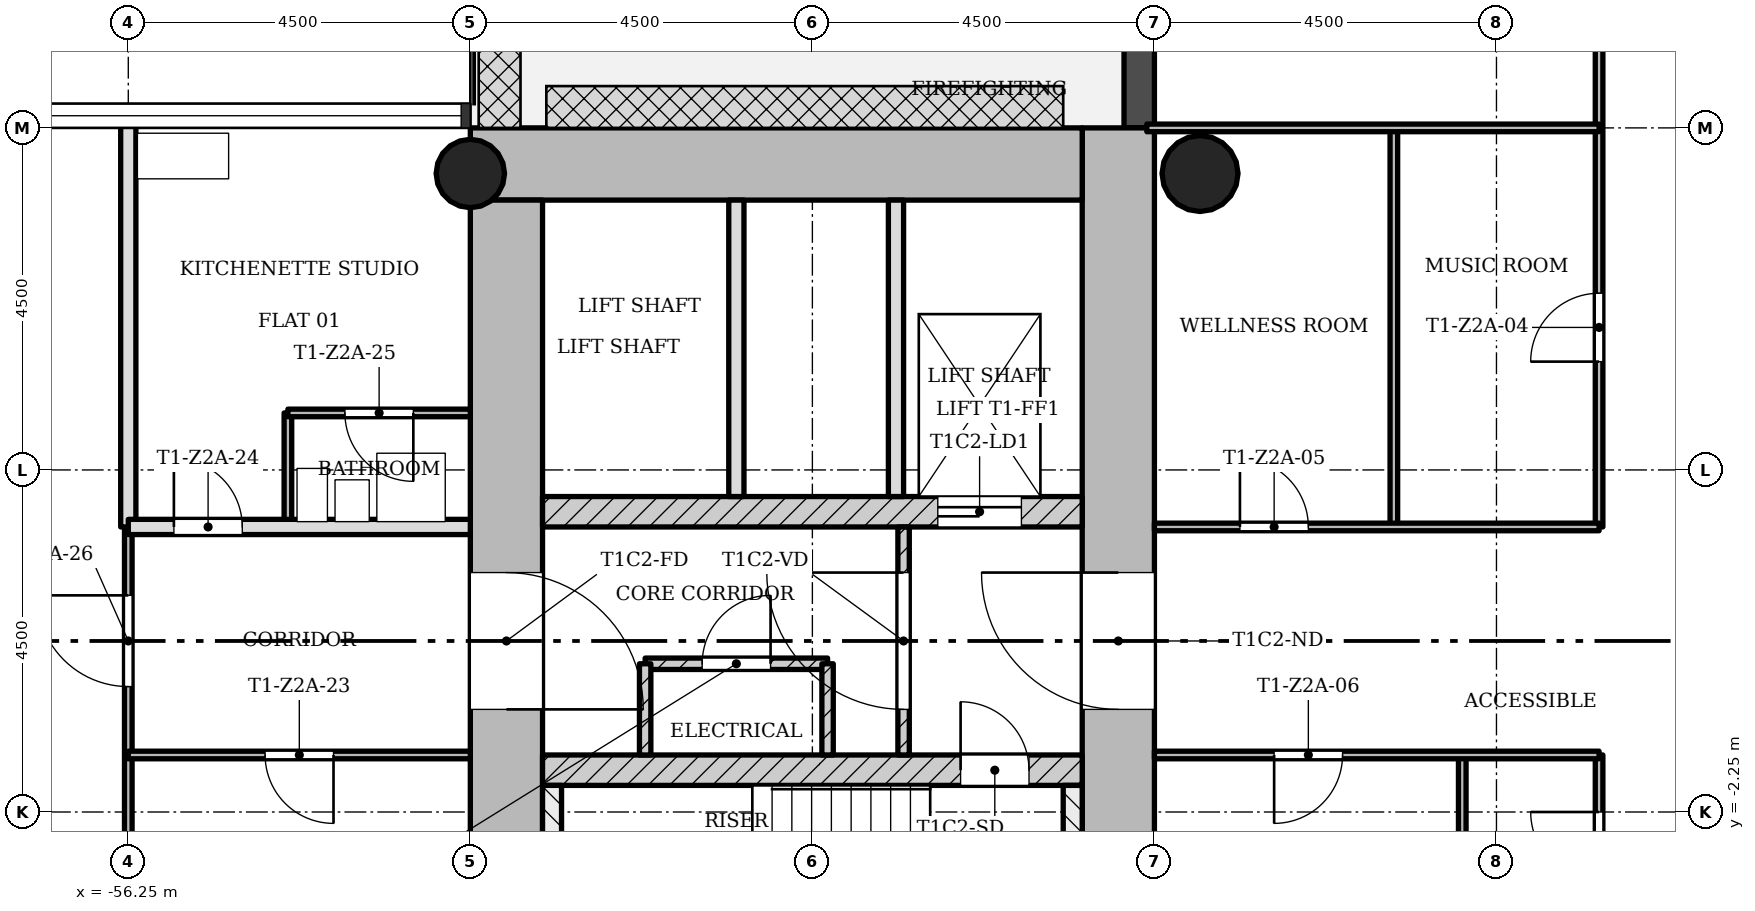
"""IFC4 building model, lengths in metres.
Left out: names, types, materials, properties, quantities, classifications, styles, units other than length and angle.
Written with IfcOpenShell. Run it as: python <this file> out.ifc"""

import sys

from ifc_helpers import new_model, si_unit, direction, frame, frame_2d, origin, origin_2d, place, context, subcontext, project, spatial, rectangle, hollow_circle, extrude, element, fill, save


model = new_model("IFC4")
c1 = context("Model", 3, precision=1e-05, world=origin(), true_north=direction((0.0, 1.0)))
c2 = subcontext(c1, "Body", "Model", "MODEL_VIEW")
j1 = project(units=[si_unit("LENGTHUNIT", "METRE"), si_unit("PLANEANGLEUNIT", "RADIAN")], contexts=[c1])
p1 = place(None, origin())
s1 = spatial("IfcSite", under=j1, at=p1, CompositionType="ELEMENT")
p2 = place(p1, origin())
s2 = spatial("IfcBuilding", under=s1, at=p2, CompositionType="ELEMENT")
p3 = place(p2, frame((0.0, 0.0, 117.4)))
s3 = spatial("IfcBuildingStorey", under=s2, at=p3, CompositionType="ELEMENT", Elevation=117.4)
p4 = place(p3, frame((-43.225, -5.8, 0.0), z_axis=(0.0, 0.0, 1.0), x_axis=(0.0, 1.0, 0.0)))
e1 = element("IfcWall", 1, at=p4, inside=s3, PredefinedType="SHEAR", context=c2, shape_type="SweptSolid", body=[
    extrude(rectangle(XDim=12.55, YDim=0.95, at=frame_2d((6.275, 0.0))), origin(), (0.0, 0.0, 1.0), 3.4),
])
p5 = place(p4, frame((4.9, 0.0, 0.0)))
e2 = element("IfcOpeningElement", 2, at=p5, cuts=e1, PredefinedType="OPENING", context=c2, shape_type="SweptSolid", body=[
    extrude(rectangle(XDim=1.8, YDim=2.1, at=frame_2d((0.9, 1.05))), frame((0.0, 0.485, 0.0), z_axis=(0.0, -1.0, 0.0), x_axis=(1.0, 0.0, 0.0)), (0.0, 0.0, 1.0), 0.97),
])
p6 = place(p3, frame((-43.7, 6.275, 0.0), z_axis=(0.0, 0.0, 1.0), x_axis=(-1.0, 0.0, 0.0)))
e3 = element("IfcWall", 3, at=p6, inside=s3, PredefinedType="SHEAR", context=c2, shape_type="SweptSolid", body=[
    extrude(rectangle(XDim=8.05, YDim=0.95, at=frame_2d((4.025, 0.0))), origin(), (0.0, 0.0, 1.0), 3.4),
])
p7 = place(p3, frame((-51.275, 5.8, 0.0), z_axis=(0.0, 0.0, 1.0), x_axis=(0.0, -1.0, 0.0)))
e4 = element("IfcWall", 4, at=p7, inside=s3, PredefinedType="SHEAR", context=c2, shape_type="SweptSolid", body=[
    extrude(rectangle(XDim=12.55, YDim=0.95, at=frame_2d((6.275, 0.0))), origin(), (0.0, 0.0, 1.0), 3.4),
])
p8 = place(p7, frame((4.9, 0.0, 0.0)))
e5 = element("IfcOpeningElement", 5, at=p8, cuts=e4, PredefinedType="OPENING", context=c2, shape_type="SweptSolid", body=[
    extrude(rectangle(XDim=1.8, YDim=2.1, at=frame_2d((0.9, 1.05))), frame((0.0, 0.485, 0.0), z_axis=(0.0, -1.0, 0.0), x_axis=(1.0, 0.0, 0.0)), (0.0, 0.0, 1.0), 0.97),
])
p9 = place(p3, frame((-50.8, -1.7, 0.0), z_axis=(0.0, 0.0, 1.0), x_axis=(1.0, 0.0, 0.0)))
e6 = element("IfcWall", 6, at=p9, inside=s3, PredefinedType="SHEAR", context=c2, shape_type="SweptSolid", body=[
    extrude(rectangle(XDim=7.1, YDim=0.4, at=frame_2d((3.55, 0.0))), origin(), (0.0, 0.0, 1.0), 3.4),
])
p10 = place(p9, frame((5.5, 0.0, 0.0)))
e7 = element("IfcOpeningElement", 7, at=p10, cuts=e6, PredefinedType="OPENING", context=c2, shape_type="SweptSolid", body=[
    extrude(rectangle(XDim=0.9, YDim=2.1, at=frame_2d((0.45, 1.05))), frame((0.0, 0.21, 0.0), z_axis=(0.0, -1.0, 0.0), x_axis=(1.0, 0.0, 0.0)), (0.0, 0.0, 1.0), 0.42),
])
p11 = place(p3, frame((-50.8, 1.7, 0.0), z_axis=(0.0, 0.0, 1.0), x_axis=(1.0, 0.0, 0.0)))
e8 = element("IfcWall", 8, at=p11, inside=s3, PredefinedType="SHEAR", context=c2, shape_type="SweptSolid", body=[
    extrude(rectangle(XDim=7.1, YDim=0.4, at=frame_2d((3.55, 0.0))), origin(), (0.0, 0.0, 1.0), 3.4),
])
p12 = place(p11, frame((5.2, 0.0, 0.0)))
e9 = element("IfcOpeningElement", 9, at=p12, cuts=e8, PredefinedType="OPENING", context=c2, shape_type="SweptSolid", body=[
    extrude(rectangle(XDim=1.1, YDim=2.1, at=frame_2d((0.55, 1.05))), frame((0.0, 0.21, 0.0), z_axis=(0.0, -1.0, 0.0), x_axis=(1.0, 0.0, 0.0)), (0.0, 0.0, 1.0), 0.42),
])
p13 = place(p3, frame((-51.75, 6.15, 0.0), z_axis=(0.0, 0.0, 1.0), x_axis=(1.0, 0.0, 0.0)))
e10 = element("IfcColumn", 10, at=p13, inside=s3, PredefinedType="COLUMN", context=c2, shape_type="SweptSolid", body=[
    extrude(hollow_circle(Radius=0.45, WallThickness=0.032, at=origin_2d()), origin(), (0.0, 0.0, 1.0), 3.4),
])
p14 = place(p3, frame((-42.15, 6.15, 0.0), z_axis=(0.0, 0.0, 1.0), x_axis=(1.0, 0.0, 0.0)))
e11 = element("IfcColumn", 11, at=p14, inside=s3, PredefinedType="COLUMN", context=c2, shape_type="SweptSolid", body=[
    extrude(hollow_circle(Radius=0.5, WallThickness=0.036, at=origin_2d()), origin(), (0.0, 0.0, 1.0), 3.4),
])
p15 = place(p3, frame((-42.95, 11.25, -0.02), z_axis=(0.0, 0.0, 1.0), x_axis=(0.0, -1.0, 0.0)))
e12 = element("IfcWall", 12, at=p15, inside=s3, PredefinedType="STANDARD", context=c2, shape_type="SweptSolid", body=[
    extrude(rectangle(XDim=4.5, YDim=0.4, at=frame_2d((2.25, 0.0))), origin(), (0.0, 0.0, 1.0), 3.12),
])
p16 = place(p15, frame((1.35, 0.0, 0.02)))
e13 = element("IfcOpeningElement", 13, at=p16, cuts=e12, PredefinedType="OPENING", context=c2, shape_type="SweptSolid", body=[
    extrude(rectangle(XDim=1.8, YDim=2.1, at=frame_2d((0.9, 1.05))), frame((0.0, 0.21, 0.0), z_axis=(0.0, -1.0, 0.0), x_axis=(1.0, 0.0, 0.0)), (0.0, 0.0, 1.0), 0.42),
])
p17 = place(p3, frame((-46.05, 1.5, 0.0), z_axis=(0.0, 0.0, 1.0), x_axis=(0.0, -1.0, 0.0)))
e14 = element("IfcWall", 14, at=p17, inside=s3, PredefinedType="PARTITIONING", context=c2, shape_type="SweptSolid", body=[
    extrude(rectangle(XDim=3.0, YDim=0.15, at=frame_2d((1.5, 0.0))), origin(), (0.0, 0.0, 1.0), 3.0),
])
p18 = place(p17, frame((0.6, 0.0, 0.0)))
e15 = element("IfcOpeningElement", 15, at=p18, cuts=e14, PredefinedType="OPENING", context=c2, shape_type="SweptSolid", body=[
    extrude(rectangle(XDim=1.8, YDim=2.1, at=frame_2d((0.9, 1.05))), frame((0.0, 0.085, 0.0), z_axis=(0.0, -1.0, 0.0), x_axis=(1.0, 0.0, 0.0)), (0.0, 0.0, 1.0), 0.17),
])
for number, where, z_axis, x_axis in (
    (16, (-46.15, 5.8, 0.0), (0.0, 0.0, 1.0), (0.0, -1.0, 0.0)),
    (17, (-48.25, 5.8, 0.0), (0.0, 0.0, 1.0), (0.0, -1.0, 0.0)),
):
    element("IfcWall", number, at=place(p3, frame(where, z_axis=z_axis, x_axis=x_axis)), inside=s3, PredefinedType="SOLIDWALL", context=c2, shape_type="SweptSolid", body=[
        extrude(rectangle(XDim=3.9, YDim=0.2, at=frame_2d((1.95, 0.0))), origin(), (0.0, 0.0, 1.0), 3.0),
    ])
p19 = place(p3, frame((-47.05, -0.3, 0.0), z_axis=(0.0, 0.0, 1.0), x_axis=(-1.0, 0.0, 0.0)))
e18 = element("IfcWall", 18, at=p19, inside=s3, PredefinedType="PARTITIONING", context=c2, shape_type="SweptSolid", body=[
    extrude(rectangle(XDim=2.4, YDim=0.15, at=frame_2d((1.2, 0.0))), origin(), (0.0, 0.0, 1.0), 3.0),
])
p20 = place(p19, frame((0.75, 0.0, 0.0)))
e19 = element("IfcOpeningElement", 19, at=p20, cuts=e18, PredefinedType="OPENING", context=c2, shape_type="SweptSolid", body=[
    extrude(rectangle(XDim=0.9, YDim=2.1, at=frame_2d((0.45, 1.05))), frame((0.0, 0.085, 0.0), z_axis=(0.0, -1.0, 0.0), x_axis=(1.0, 0.0, 0.0)), (0.0, 0.0, 1.0), 0.17),
])
for number, where, z_axis, x_axis in (
    (20, (-47.05, -0.3, 0.0), (0.0, 0.0, 1.0), (0.0, -1.0, 0.0)),
    (21, (-49.45, -0.3, 0.0), (0.0, 0.0, 1.0), (0.0, -1.0, 0.0)),
):
    element("IfcWall", number, at=place(p3, frame(where, z_axis=z_axis, x_axis=x_axis)), inside=s3, PredefinedType="PARTITIONING", context=c2, shape_type="SweptSolid", body=[
        extrude(rectangle(XDim=1.2, YDim=0.15, at=frame_2d((0.6, 0.0))), origin(), (0.0, 0.0, 1.0), 3.0),
    ])
p21 = place(p3, frame((-56.25, -6.85, 0.0), z_axis=(0.0, 0.0, 1.0), x_axis=(0.0, 1.0, 0.0)))
e22 = element("IfcWall", 22, at=p21, inside=s3, PredefinedType="PARTITIONING", context=c2, shape_type="SweptSolid", body=[
    extrude(rectangle(XDim=8.35, YDim=0.1, at=frame_2d((4.175, 0.0))), origin(), (0.0, 0.0, 1.0), 3.0),
])
p22 = place(p21, frame((6.25, 0.0, 0.0)))
e23 = element("IfcOpeningElement", 23, at=p22, cuts=e22, PredefinedType="OPENING", context=c2, shape_type="SweptSolid", body=[
    extrude(rectangle(XDim=1.2, YDim=2.1, at=frame_2d((0.6, 1.05))), frame((0.0, 0.06, 0.0), z_axis=(0.0, -1.0, 0.0), x_axis=(1.0, 0.0, 0.0)), (0.0, 0.0, 1.0), 0.12),
])
p23 = place(p3, frame((-56.25, 1.5, 0.0), z_axis=(0.0, 0.0, 1.0), x_axis=(0.0, 1.0, 0.0)))
e24 = element("IfcWall", 24, at=p23, inside=s3, PredefinedType="SOLIDWALL", context=c2, shape_type="SweptSolid", body=[
    extrude(rectangle(XDim=5.35, YDim=0.2, at=frame_2d((2.675, 0.0))), origin(), (0.0, 0.0, 1.0), 3.0),
])
p24 = place(p3, frame((-54.15, 1.5, 0.0), z_axis=(0.0, 0.0, 1.0), x_axis=(0.0, 1.0, 0.0)))
e25 = element("IfcWall", 25, at=p24, inside=s3, PredefinedType="PARTITIONING", context=c2, shape_type="SweptSolid", body=[
    extrude(rectangle(XDim=1.5, YDim=0.1, at=frame_2d((0.75, 0.0))), origin(), (0.0, 0.0, 1.0), 3.0),
])
p25 = place(p3, frame((-39.6, 1.5, 0.0), z_axis=(0.0, 0.0, 1.0), x_axis=(0.0, 1.0, 0.0)))
e26 = element("IfcWall", 26, at=p25, inside=s3, PredefinedType="PARTITIONING", context=c2, shape_type="SweptSolid", body=[
    extrude(rectangle(XDim=5.25, YDim=0.1, at=frame_2d((2.625, 0.0))), origin(), (0.0, 0.0, 1.0), 3.0),
])
p26 = place(p3, frame((-38.7, -3.9, 0.0), z_axis=(0.0, 0.0, 1.0), x_axis=(0.0, 1.0, 0.0)))
e27 = element("IfcWall", 27, at=p26, inside=s3, PredefinedType="PARTITIONING", context=c2, shape_type="SweptSolid", body=[
    extrude(rectangle(XDim=2.4, YDim=0.1, at=frame_2d((1.2, 0.0))), origin(), (0.0, 0.0, 1.0), 3.0),
])
p27 = place(p3, frame((-36.9, -6.75, 0.0), z_axis=(0.0, 0.0, 1.0), x_axis=(0.0, 1.0, 0.0)))
e28 = element("IfcWall", 28, at=p27, inside=s3, PredefinedType="PARTITIONING", context=c2, shape_type="SweptSolid", body=[
    extrude(rectangle(XDim=5.25, YDim=0.1, at=frame_2d((2.625, 0.0))), origin(), (0.0, 0.0, 1.0), 3.0),
])
p28 = place(p27, frame((3.6, 0.0, 0.0)))
e29 = element("IfcOpeningElement", 29, at=p28, cuts=e28, PredefinedType="OPENING", context=c2, shape_type="SweptSolid", body=[
    extrude(rectangle(XDim=0.9, YDim=2.1, at=frame_2d((0.45, 1.05))), frame((0.0, 0.06, 0.0), z_axis=(0.0, -1.0, 0.0), x_axis=(1.0, 0.0, 0.0)), (0.0, 0.0, 1.0), 0.12),
])
p29 = place(p27, frame((0.975, 0.0, 0.0)))
e30 = element("IfcOpeningElement", 30, at=p29, cuts=e28, PredefinedType="OPENING", context=c2, shape_type="SweptSolid", body=[
    extrude(rectangle(XDim=0.9, YDim=2.1, at=frame_2d((0.45, 1.05))), frame((0.0, 0.06, 0.0), z_axis=(0.0, -1.0, 0.0), x_axis=(1.0, 0.0, 0.0)), (0.0, 0.0, 1.0), 0.12),
])
p30 = place(p3, frame((-36.9, 1.5, 0.0), z_axis=(0.0, 0.0, 1.0), x_axis=(0.0, 1.0, 0.0)))
e31 = element("IfcWall", 31, at=p30, inside=s3, PredefinedType="PARTITIONING", context=c2, shape_type="SweptSolid", body=[
    extrude(rectangle(XDim=9.75, YDim=0.1, at=frame_2d((4.875, 0.0))), origin(), (0.0, 0.0, 1.0), 3.0),
])
p31 = place(p30, frame((2.175, 0.0, 0.0)))
e32 = element("IfcOpeningElement", 32, at=p31, cuts=e31, PredefinedType="OPENING", context=c2, shape_type="SweptSolid", body=[
    extrude(rectangle(XDim=0.9, YDim=2.1, at=frame_2d((0.45, 1.05))), frame((0.0, 0.06, 0.0), z_axis=(0.0, -1.0, 0.0), x_axis=(1.0, 0.0, 0.0)), (0.0, 0.0, 1.0), 0.12),
])
p32 = place(p30, frame((7.05, 0.0, 0.0)))
e33 = element("IfcOpeningElement", 33, at=p32, cuts=e31, PredefinedType="OPENING", context=c2, shape_type="SweptSolid", body=[
    extrude(rectangle(XDim=0.9, YDim=2.1, at=frame_2d((0.45, 1.05))), frame((0.0, 0.06, 0.0), z_axis=(0.0, -1.0, 0.0), x_axis=(1.0, 0.0, 0.0)), (0.0, 0.0, 1.0), 0.12),
])
p33 = place(p3, frame((-56.25, -1.5, 0.0), z_axis=(0.0, 0.0, 1.0), x_axis=(1.0, 0.0, 0.0)))
e34 = element("IfcWall", 34, at=p33, inside=s3, PredefinedType="PARTITIONING", context=c2, shape_type="SweptSolid", body=[
    extrude(rectangle(XDim=4.5, YDim=0.1, at=frame_2d((2.25, 0.0))), origin(), (0.0, 0.0, 1.0), 3.0),
])
p34 = place(p33, frame((1.8, 0.0, 0.0)))
e35 = element("IfcOpeningElement", 35, at=p34, cuts=e34, PredefinedType="OPENING", context=c2, shape_type="SweptSolid", body=[
    extrude(rectangle(XDim=0.9, YDim=2.1, at=frame_2d((0.45, 1.05))), frame((0.0, 0.06, 0.0), z_axis=(0.0, -1.0, 0.0), x_axis=(1.0, 0.0, 0.0)), (0.0, 0.0, 1.0), 0.12),
])
p35 = place(p3, frame((-42.75, -1.5, 0.0), z_axis=(0.0, 0.0, 1.0), x_axis=(1.0, 0.0, 0.0)))
e36 = element("IfcWall", 36, at=p35, inside=s3, PredefinedType="PARTITIONING", context=c2, shape_type="SweptSolid", body=[
    extrude(rectangle(XDim=5.85, YDim=0.1, at=frame_2d((2.925, 0.0))), origin(), (0.0, 0.0, 1.0), 3.0),
])
p36 = place(p35, frame((1.575, 0.0, 0.0)))
e37 = element("IfcOpeningElement", 37, at=p36, cuts=e36, PredefinedType="OPENING", context=c2, shape_type="SweptSolid", body=[
    extrude(rectangle(XDim=0.9, YDim=2.1, at=frame_2d((0.45, 1.05))), frame((0.0, 0.06, 0.0), z_axis=(0.0, -1.0, 0.0), x_axis=(1.0, 0.0, 0.0)), (0.0, 0.0, 1.0), 0.12),
])
p37 = place(p3, frame((-42.75, 1.5, 0.0), z_axis=(0.0, 0.0, 1.0), x_axis=(1.0, 0.0, 0.0)))
e38 = element("IfcWall", 38, at=p37, inside=s3, PredefinedType="PARTITIONING", context=c2, shape_type="SweptSolid", body=[
    extrude(rectangle(XDim=5.85, YDim=0.1, at=frame_2d((2.925, 0.0))), origin(), (0.0, 0.0, 1.0), 3.0),
])
p38 = place(p37, frame((1.125, 0.0, 0.0)))
e39 = element("IfcOpeningElement", 39, at=p38, cuts=e38, PredefinedType="OPENING", context=c2, shape_type="SweptSolid", body=[
    extrude(rectangle(XDim=0.9, YDim=2.1, at=frame_2d((0.45, 1.05))), frame((0.0, 0.06, 0.0), z_axis=(0.0, -1.0, 0.0), x_axis=(1.0, 0.0, 0.0)), (0.0, 0.0, 1.0), 0.12),
])
p39 = place(p3, frame((-56.25, 1.5, 0.0), z_axis=(0.0, 0.0, 1.0), x_axis=(1.0, 0.0, 0.0)))
e40 = element("IfcWall", 40, at=p39, inside=s3, PredefinedType="SOLIDWALL", context=c2, shape_type="SweptSolid", body=[
    extrude(rectangle(XDim=4.5, YDim=0.2, at=frame_2d((2.25, 0.0))), origin(), (0.0, 0.0, 1.0), 3.0),
])
p40 = place(p39, frame((0.6, 0.0, 0.0)))
e41 = element("IfcOpeningElement", 41, at=p40, cuts=e40, PredefinedType="OPENING", context=c2, shape_type="SweptSolid", body=[
    extrude(rectangle(XDim=0.9, YDim=2.1, at=frame_2d((0.45, 1.05))), frame((0.0, 0.11, 0.0), z_axis=(0.0, -1.0, 0.0), x_axis=(1.0, 0.0, 0.0)), (0.0, 0.0, 1.0), 0.22),
])
p41 = place(p3, frame((-54.15, 3.0, 0.0), z_axis=(0.0, 0.0, 1.0), x_axis=(1.0, 0.0, 0.0)))
e42 = element("IfcWall", 42, at=p41, inside=s3, PredefinedType="PARTITIONING", context=c2, shape_type="SweptSolid", body=[
    extrude(rectangle(XDim=2.4, YDim=0.1, at=frame_2d((1.2, 0.0))), origin(), (0.0, 0.0, 1.0), 3.0),
])
p42 = place(p41, frame((0.75, 0.0, 0.0)))
e43 = element("IfcOpeningElement", 43, at=p42, cuts=e42, PredefinedType="OPENING", context=c2, shape_type="SweptSolid", body=[
    extrude(rectangle(XDim=0.9, YDim=2.1, at=frame_2d((0.45, 1.05))), frame((0.0, 0.06, 0.0), z_axis=(0.0, -1.0, 0.0), x_axis=(1.0, 0.0, 0.0)), (0.0, 0.0, 1.0), 0.12),
])
p43 = place(p3, frame((-42.85, 6.75, 0.0), z_axis=(0.0, 0.0, 1.0), x_axis=(1.0, 0.0, 0.0)))
e44 = element("IfcWall", 44, at=p43, inside=s3, PredefinedType="PARTITIONING", context=c2, shape_type="SweptSolid", body=[
    extrude(rectangle(XDim=5.95, YDim=0.1, at=frame_2d((2.975, 0.0))), origin(), (0.0, 0.0, 1.0), 3.0),
])
for number, where, z_axis, x_axis in (
    (45, (-50.675, -1.9, 0.0), (0.0, 0.0, 1.0), (0.0, -1.0, 0.0)),
    (46, (-43.825, -1.9, 0.0), (0.0, 0.0, 1.0), (0.0, -1.0, 0.0)),
):
    element("IfcWall", number, at=place(p3, frame(where, z_axis=z_axis, x_axis=x_axis)), inside=s3, PredefinedType="SHEAR", context=c2, shape_type="SweptSolid", body=[
        extrude(rectangle(XDim=3.9, YDim=0.25, at=frame_2d((1.95, 0.0))), origin(), (0.0, 0.0, 1.0), 3.4),
    ])
p44 = place(p18, origin())
e47 = element("IfcDoor", 47, at=p44, inside=s3, OperationType="SINGLE_SWING_LEFT", PredefinedType="DOOR", context=c2, shape_type="SweptSolid", body=[
    extrude(rectangle(XDim=1.8, YDim=2.1, at=frame_2d((0.9, 1.05))), frame((0.0, 0.025, 0.0), z_axis=(0.0, -1.0, 0.0), x_axis=(1.0, 0.0, 0.0)), (0.0, 0.0, 1.0), 0.05),
])
fill(e15, e47)
p45 = place(p20, origin())
e48 = element("IfcDoor", 48, at=p45, inside=s3, OperationType="SINGLE_SWING_LEFT", PredefinedType="DOOR", context=c2, shape_type="SweptSolid", body=[
    extrude(rectangle(XDim=0.9, YDim=2.1, at=frame_2d((0.45, 1.05))), frame((0.0, 0.025, 0.0), z_axis=(0.0, -1.0, 0.0), x_axis=(1.0, 0.0, 0.0)), (0.0, 0.0, 1.0), 0.05),
])
fill(e19, e48)
p46 = place(p28, origin())
e49 = element("IfcDoor", 49, at=p46, inside=s3, OperationType="SINGLE_SWING_LEFT", PredefinedType="DOOR", context=c2, shape_type="SweptSolid", body=[
    extrude(rectangle(XDim=0.9, YDim=2.1, at=frame_2d((0.45, 1.05))), frame((0.0, 0.025, 0.0), z_axis=(0.0, -1.0, 0.0), x_axis=(1.0, 0.0, 0.0)), (0.0, 0.0, 1.0), 0.05),
])
fill(e29, e49)
p47 = place(p31, origin())
e50 = element("IfcDoor", 50, at=p47, inside=s3, OperationType="SINGLE_SWING_RIGHT", PredefinedType="DOOR", context=c2, shape_type="SweptSolid", body=[
    extrude(rectangle(XDim=0.9, YDim=2.1, at=frame_2d((0.45, 1.05))), frame((0.0, 0.025, 0.0), z_axis=(0.0, -1.0, 0.0), x_axis=(1.0, 0.0, 0.0)), (0.0, 0.0, 1.0), 0.05),
])
fill(e32, e50)
p48 = place(p38, origin())
e51 = element("IfcDoor", 51, at=p48, inside=s3, OperationType="SINGLE_SWING_RIGHT", PredefinedType="DOOR", context=c2, shape_type="SweptSolid", body=[
    extrude(rectangle(XDim=0.9, YDim=2.1, at=frame_2d((0.45, 1.05))), frame((0.0, 0.025, 0.0), z_axis=(0.0, -1.0, 0.0), x_axis=(1.0, 0.0, 0.0)), (0.0, 0.0, 1.0), 0.05),
])
fill(e39, e51)
p49 = place(p36, origin())
e52 = element("IfcDoor", 52, at=p49, inside=s3, OperationType="SINGLE_SWING_LEFT", PredefinedType="DOOR", context=c2, shape_type="SweptSolid", body=[
    extrude(rectangle(XDim=0.9, YDim=2.1, at=frame_2d((0.45, 1.05))), frame((0.0, 0.025, 0.0), z_axis=(0.0, -1.0, 0.0), x_axis=(1.0, 0.0, 0.0)), (0.0, 0.0, 1.0), 0.05),
])
fill(e37, e52)
p50 = place(p34, origin())
e53 = element("IfcDoor", 53, at=p50, inside=s3, OperationType="SINGLE_SWING_RIGHT", PredefinedType="DOOR", context=c2, shape_type="SweptSolid", body=[
    extrude(rectangle(XDim=0.9, YDim=2.1, at=frame_2d((0.45, 1.05))), frame((0.0, 0.025, 0.0), z_axis=(0.0, -1.0, 0.0), x_axis=(1.0, 0.0, 0.0)), (0.0, 0.0, 1.0), 0.05),
])
fill(e35, e53)
p51 = place(p40, origin())
e54 = element("IfcDoor", 54, at=p51, inside=s3, OperationType="SINGLE_SWING_RIGHT", PredefinedType="DOOR", context=c2, shape_type="SweptSolid", body=[
    extrude(rectangle(XDim=0.9, YDim=2.1, at=frame_2d((0.45, 1.05))), frame((0.0, 0.025, 0.0), z_axis=(0.0, -1.0, 0.0), x_axis=(1.0, 0.0, 0.0)), (0.0, 0.0, 1.0), 0.05),
])
fill(e41, e54)
p52 = place(p42, origin())
e55 = element("IfcDoor", 55, at=p52, inside=s3, OperationType="SINGLE_SWING_RIGHT", PredefinedType="DOOR", context=c2, shape_type="SweptSolid", body=[
    extrude(rectangle(XDim=0.9, YDim=2.1, at=frame_2d((0.45, 1.05))), frame((0.0, 0.025, 0.0), z_axis=(0.0, -1.0, 0.0), x_axis=(1.0, 0.0, 0.0)), (0.0, 0.0, 1.0), 0.05),
])
fill(e43, e55)
p53 = place(p22, origin())
e56 = element("IfcDoor", 56, at=p53, inside=s3, OperationType="SINGLE_SWING_LEFT", PredefinedType="DOOR", context=c2, shape_type="SweptSolid", body=[
    extrude(rectangle(XDim=1.2, YDim=2.1, at=frame_2d((0.6, 1.05))), frame((0.0, 0.025, 0.0), z_axis=(0.0, -1.0, 0.0), x_axis=(1.0, 0.0, 0.0)), (0.0, 0.0, 1.0), 0.05),
])
fill(e23, e56)
p54 = place(p10, origin())
e57 = element("IfcDoor", 57, at=p54, inside=s3, OperationType="SINGLE_SWING_RIGHT", PredefinedType="DOOR", context=c2, shape_type="SweptSolid", body=[
    extrude(rectangle(XDim=0.9, YDim=2.1, at=frame_2d((0.45, 1.05))), frame((0.0, 0.025, 0.0), z_axis=(0.0, -1.0, 0.0), x_axis=(1.0, 0.0, 0.0)), (0.0, 0.0, 1.0), 0.05),
])
fill(e7, e57)
p55 = place(p12, origin())
e58 = element("IfcDoor", 58, at=p55, inside=s3, OperationType="SLIDING_TO_LEFT", PredefinedType="DOOR", context=c2, shape_type="SweptSolid", body=[
    extrude(rectangle(XDim=1.1, YDim=2.1, at=frame_2d((0.55, 1.05))), frame((0.0, 0.025, 0.0), z_axis=(0.0, -1.0, 0.0), x_axis=(1.0, 0.0, 0.0)), (0.0, 0.0, 1.0), 0.05),
])
fill(e9, e58)
p56 = place(p5, origin())
e59 = element("IfcDoor", 59, at=p56, inside=s3, OperationType="SINGLE_SWING_LEFT", PredefinedType="DOOR", context=c2, shape_type="SweptSolid", body=[
    extrude(rectangle(XDim=1.8, YDim=2.1, at=frame_2d((0.9, 1.05))), frame((0.0, 0.025, 0.0), z_axis=(0.0, -1.0, 0.0), x_axis=(1.0, 0.0, 0.0)), (0.0, 0.0, 1.0), 0.05),
])
fill(e2, e59)
p57 = place(p8, origin())
e60 = element("IfcDoor", 60, at=p57, inside=s3, OperationType="SINGLE_SWING_LEFT", PredefinedType="DOOR", context=c2, shape_type="SweptSolid", body=[
    extrude(rectangle(XDim=1.8, YDim=2.1, at=frame_2d((0.9, 1.05))), frame((0.0, 0.025, 0.0), z_axis=(0.0, -1.0, 0.0), x_axis=(1.0, 0.0, 0.0)), (0.0, 0.0, 1.0), 0.05),
])
fill(e5, e60)
save(model, sys.argv[1])
